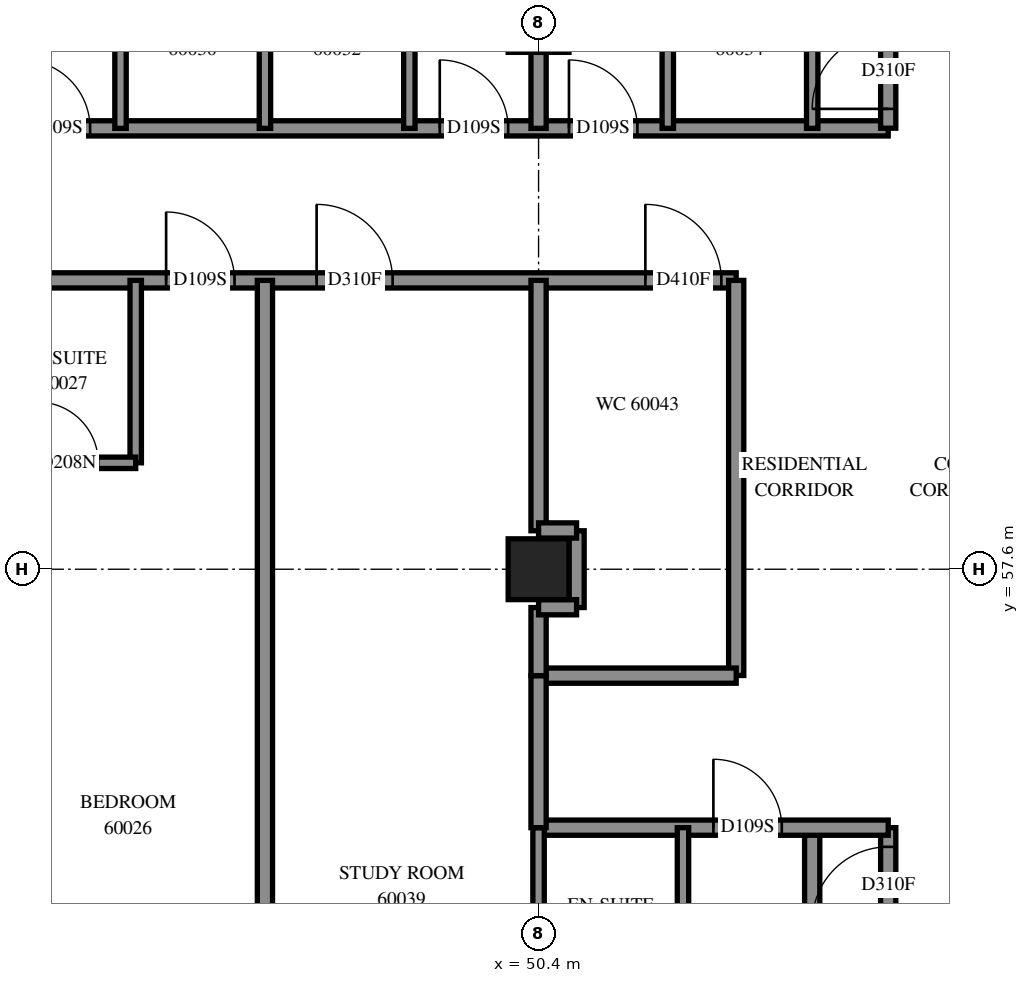
"""IFC4 building model, lengths in metres.
Left out: names, types, materials, properties, quantities, classifications, styles, units other than length and angle.
Written with IfcOpenShell. Run it as: python <this file> out.ifc"""

import sys

from ifc_helpers import new_model, si_unit, direction, frame, frame_2d, origin, origin_2d, place, context, subcontext, project, spatial, rectangle, extrude, element, fill, save


model = new_model("IFC4")
c1 = context("Model", 3, precision=1e-05, world=origin(), true_north=direction((0.0, 1.0)))
c2 = subcontext(c1, "Body", "Model", "MODEL_VIEW")
j1 = project(units=[si_unit("LENGTHUNIT", "METRE"), si_unit("PLANEANGLEUNIT", "RADIAN")], contexts=[c1])
p1 = place(None, origin())
s1 = spatial("IfcSite", under=j1, at=p1, CompositionType="ELEMENT")
p2 = place(p1, origin())
s2 = spatial("IfcBuilding", under=s1, at=p2, CompositionType="ELEMENT")
p3 = place(p2, frame((0.0, 0.0, 220.2)))
s3 = spatial("IfcBuildingStorey", under=s2, at=p3, CompositionType="ELEMENT", Elevation=220.2)
for number, where, z_axis, x_axis in (
    (1, (50.4, 57.6, 0.0), (0.0, 0.0, 1.0), (1.0, 0.0, 0.0)),
    (2, (50.4, 64.8, 0.0), (0.0, 0.0, 1.0), (1.0, 0.0, 0.0)),
):
    element("IfcColumn", number, at=place(p3, frame(where, z_axis=z_axis, x_axis=x_axis)), inside=s3, PredefinedType="COLUMN", context=c2, shape_type="SweptSolid", body=[
        extrude(rectangle(XDim=0.8, YDim=0.8, at=origin_2d()), origin(), (0.0, 0.0, 1.0), 3.1),
    ])
p4 = place(p3, frame((36.0, 61.4, 0.0), z_axis=(0.0, 0.0, 1.0), x_axis=(1.0, 0.0, 0.0)))
e3 = element("IfcWall", 3, at=p4, inside=s3, PredefinedType="PARTITIONING", context=c2, shape_type="SweptSolid", body=[
    extrude(rectangle(XDim=17.0, YDim=0.2, at=frame_2d((8.5, 0.0))), origin(), (0.0, 0.0, 1.0), 3.1),
])
p5 = place(p4, frame((2.3, 0.0, 0.0)))
e4 = element("IfcOpeningElement", 4, at=p5, cuts=e3, PredefinedType="OPENING", context=c2, shape_type="SweptSolid", body=[
    extrude(rectangle(XDim=0.9, YDim=2.1, at=frame_2d((0.45, 1.05))), frame((0.0, 0.11, 0.0), z_axis=(0.0, -1.0, 0.0), x_axis=(1.0, 0.0, 0.0)), (0.0, 0.0, 1.0), 0.22),
])
p6 = place(p4, frame((4.125, 0.0, 0.0)))
e5 = element("IfcOpeningElement", 5, at=p6, cuts=e3, PredefinedType="OPENING", context=c2, shape_type="SweptSolid", body=[
    extrude(rectangle(XDim=1.0, YDim=2.1, at=frame_2d((0.5, 1.05))), frame((0.0, 0.11, 0.0), z_axis=(0.0, -1.0, 0.0), x_axis=(1.0, 0.0, 0.0)), (0.0, 0.0, 1.0), 0.22),
])
p7 = place(p4, frame((9.5, 0.0, 0.0)))
e6 = element("IfcOpeningElement", 6, at=p7, cuts=e3, PredefinedType="OPENING", context=c2, shape_type="SweptSolid", body=[
    extrude(rectangle(XDim=0.9, YDim=2.1, at=frame_2d((0.45, 1.05))), frame((0.0, 0.11, 0.0), z_axis=(0.0, -1.0, 0.0), x_axis=(1.0, 0.0, 0.0)), (0.0, 0.0, 1.0), 0.22),
])
p8 = place(p4, frame((11.48, 0.0, 0.0)))
e7 = element("IfcOpeningElement", 7, at=p8, cuts=e3, PredefinedType="OPENING", context=c2, shape_type="SweptSolid", body=[
    extrude(rectangle(XDim=1.0, YDim=2.1, at=frame_2d((0.5, 1.05))), frame((0.0, 0.11, 0.0), z_axis=(0.0, -1.0, 0.0), x_axis=(1.0, 0.0, 0.0)), (0.0, 0.0, 1.0), 0.22),
])
p9 = place(p4, frame((15.805, 0.0, 0.0)))
e8 = element("IfcOpeningElement", 8, at=p9, cuts=e3, PredefinedType="OPENING", context=c2, shape_type="SweptSolid", body=[
    extrude(rectangle(XDim=1.0, YDim=2.1, at=frame_2d((0.5, 1.05))), frame((0.0, 0.11, 0.0), z_axis=(0.0, -1.0, 0.0), x_axis=(1.0, 0.0, 0.0)), (0.0, 0.0, 1.0), 0.22),
])
p10 = place(p3, frame((40.602, 63.4, 0.0), z_axis=(0.0, 0.0, 1.0), x_axis=(1.0, 0.0, 0.0)))
e9 = element("IfcWall", 9, at=p10, inside=s3, PredefinedType="PARTITIONING", context=c2, shape_type="SweptSolid", body=[
    extrude(rectangle(XDim=14.398, YDim=0.2, at=frame_2d((7.199, 0.0))), origin(), (0.0, 0.0, 1.0), 3.1),
])
p11 = place(p10, frame((2.998, 0.0, 0.0)))
e10 = element("IfcOpeningElement", 10, at=p11, cuts=e9, PredefinedType="OPENING", context=c2, shape_type="SweptSolid", body=[
    extrude(rectangle(XDim=0.9, YDim=2.1, at=frame_2d((0.45, 1.05))), frame((0.0, 0.11, 0.0), z_axis=(0.0, -1.0, 0.0), x_axis=(1.0, 0.0, 0.0)), (0.0, 0.0, 1.0), 0.22),
])
p12 = place(p10, frame((8.498, 0.0, 0.0)))
e11 = element("IfcOpeningElement", 11, at=p12, cuts=e9, PredefinedType="OPENING", context=c2, shape_type="SweptSolid", body=[
    extrude(rectangle(XDim=0.9, YDim=2.1, at=frame_2d((0.45, 1.05))), frame((0.0, 0.11, 0.0), z_axis=(0.0, -1.0, 0.0), x_axis=(1.0, 0.0, 0.0)), (0.0, 0.0, 1.0), 0.22),
])
p13 = place(p10, frame((10.198, 0.0, 0.0)))
e12 = element("IfcOpeningElement", 12, at=p13, cuts=e9, PredefinedType="OPENING", context=c2, shape_type="SweptSolid", body=[
    extrude(rectangle(XDim=0.9, YDim=2.1, at=frame_2d((0.45, 1.05))), frame((0.0, 0.11, 0.0), z_axis=(0.0, -1.0, 0.0), x_axis=(1.0, 0.0, 0.0)), (0.0, 0.0, 1.0), 0.22),
])
p14 = place(p3, frame((54.0, 42.319, 0.0), z_axis=(0.0, 0.0, 1.0), x_axis=(0.0, 1.0, 0.0)))
e13 = element("IfcWall", 13, at=p14, inside=s3, PredefinedType="PARTITIONING", context=c2, shape_type="SweptSolid", body=[
    extrude(rectangle(XDim=11.881, YDim=0.2, at=frame_2d((5.941, 0.0))), origin(), (0.0, 0.0, 1.0), 3.1),
])
p15 = place(p3, frame((46.8, 49.7, 0.0), z_axis=(0.0, 0.0, 1.0), x_axis=(0.0, 1.0, 0.0)))
e14 = element("IfcWall", 14, at=p15, inside=s3, PredefinedType="PARTITIONING", context=c2, shape_type="SweptSolid", body=[
    extrude(rectangle(XDim=11.7, YDim=0.2, at=frame_2d((5.85, 0.0))), origin(), (0.0, 0.0, 1.0), 3.1),
])
p16 = place(p3, frame((55.0, 47.8, 0.0), z_axis=(0.0, 0.0, 1.0), x_axis=(0.0, 1.0, 0.0)))
e15 = element("IfcWall", 15, at=p16, inside=s3, PredefinedType="PARTITIONING", context=c2, shape_type="SweptSolid", body=[
    extrude(rectangle(XDim=6.4, YDim=0.2, at=frame_2d((3.2, 0.0))), origin(), (0.0, 0.0, 1.0), 3.1),
])
p17 = place(p16, frame((5.147, 0.0, 0.0)))
e16 = element("IfcOpeningElement", 16, at=p17, cuts=e15, PredefinedType="OPENING", context=c2, shape_type="SweptSolid", body=[
    extrude(rectangle(XDim=1.0, YDim=2.1, at=frame_2d((0.5, 1.05))), frame((0.0, 0.11, 0.0), z_axis=(0.0, -1.0, 0.0), x_axis=(1.0, 0.0, 0.0)), (0.0, 0.0, 1.0), 0.22),
])
p18 = place(p3, frame((53.0, 56.202, 0.0), z_axis=(0.0, 0.0, 1.0), x_axis=(0.0, 1.0, 0.0)))
e17 = element("IfcWall", 17, at=p18, inside=s3, PredefinedType="PARTITIONING", context=c2, shape_type="SweptSolid", body=[
    extrude(rectangle(XDim=5.198, YDim=0.2, at=frame_2d((2.599, 0.0))), origin(), (0.0, 0.0, 1.0), 3.1),
])
p19 = place(p3, frame((50.4, 54.2, 0.0), z_axis=(0.0, 0.0, 1.0), x_axis=(1.0, 0.0, 0.0)))
e18 = element("IfcWall", 18, at=p19, inside=s3, PredefinedType="PARTITIONING", context=c2, shape_type="SweptSolid", body=[
    extrude(rectangle(XDim=4.6, YDim=0.2, at=frame_2d((2.3, 0.0))), origin(), (0.0, 0.0, 1.0), 3.1),
])
p20 = place(p19, frame((2.3, 0.0, 0.0)))
e19 = element("IfcOpeningElement", 19, at=p20, cuts=e18, PredefinedType="OPENING", context=c2, shape_type="SweptSolid", body=[
    extrude(rectangle(XDim=0.9, YDim=2.1, at=frame_2d((0.45, 1.05))), frame((0.0, 0.11, 0.0), z_axis=(0.0, -1.0, 0.0), x_axis=(1.0, 0.0, 0.0)), (0.0, 0.0, 1.0), 0.22),
])
p21 = place(p3, frame((55.0, 63.402, 0.0), z_axis=(0.0, 0.0, 1.0), x_axis=(0.0, 1.0, 0.0)))
e20 = element("IfcWall", 20, at=p21, inside=s3, PredefinedType="PARTITIONING", context=c2, shape_type="SweptSolid", body=[
    extrude(rectangle(XDim=3.998, YDim=0.2, at=frame_2d((1.999, 0.0))), origin(), (0.0, 0.0, 1.0), 3.1),
])
p22 = place(p21, frame((0.255, 0.0, 0.0)))
e21 = element("IfcOpeningElement", 21, at=p22, cuts=e20, PredefinedType="OPENING", context=c2, shape_type="SweptSolid", body=[
    extrude(rectangle(XDim=1.0, YDim=2.1, at=frame_2d((0.5, 1.05))), frame((0.0, 0.11, 0.0), z_axis=(0.0, -1.0, 0.0), x_axis=(1.0, 0.0, 0.0)), (0.0, 0.0, 1.0), 0.22),
])
p23 = place(p3, frame((50.4, 58.106, 0.0), z_axis=(0.0, 0.0, 1.0), x_axis=(0.0, 1.0, 0.0)))
e22 = element("IfcWall", 22, at=p23, inside=s3, PredefinedType="PARTITIONING", context=c2, shape_type="SweptSolid", body=[
    extrude(rectangle(XDim=3.294, YDim=0.2, at=frame_2d((1.647, 0.0))), origin(), (0.0, 0.0, 1.0), 3.1),
])
p24 = place(p3, frame((50.4, 56.2, 0.0), z_axis=(0.0, 0.0, 1.0), x_axis=(1.0, 0.0, 0.0)))
e23 = element("IfcWall", 23, at=p24, inside=s3, PredefinedType="PARTITIONING", context=c2, shape_type="SweptSolid", body=[
    extrude(rectangle(XDim=2.6, YDim=0.2, at=frame_2d((1.3, 0.0))), origin(), (0.0, 0.0, 1.0), 3.1),
])
for number, where, z_axis, x_axis in (
    (24, (52.3, 51.8, 0.0), (0.0, 0.0, 1.0), (0.0, 1.0, 0.0)),
    (25, (50.4, 51.8, 0.0), (0.0, 0.0, 1.0), (0.0, 1.0, 0.0)),
    (26, (45.1, 59.0, 0.0), (0.0, 0.0, 1.0), (0.0, 1.0, 0.0)),
    (27, (44.9, 63.4, 0.0), (0.0, 0.0, 1.0), (0.0, 1.0, 0.0)),
    (28, (46.8, 63.4, 0.0), (0.0, 0.0, 1.0), (0.0, 1.0, 0.0)),
    (29, (48.7, 63.4, 0.0), (0.0, 0.0, 1.0), (0.0, 1.0, 0.0)),
    (30, (52.1, 63.4, 0.0), (0.0, 0.0, 1.0), (0.0, 1.0, 0.0)),
    (31, (54.0, 63.4, 0.0), (0.0, 0.0, 1.0), (0.0, 1.0, 0.0)),
):
    element("IfcWall", number, at=place(p3, frame(where, z_axis=z_axis, x_axis=x_axis)), inside=s3, PredefinedType="PARTITIONING", context=c2, shape_type="SweptSolid", body=[
        extrude(rectangle(XDim=2.4, YDim=0.15, at=frame_2d((1.2, 0.0))), origin(), (0.0, 0.0, 1.0), 3.1),
    ])
p25 = place(p3, frame((50.4, 54.2, 0.0), z_axis=(0.0, 0.0, 1.0), x_axis=(0.0, 1.0, 0.0)))
e32 = element("IfcWall", 32, at=p25, inside=s3, PredefinedType="PARTITIONING", context=c2, shape_type="SweptSolid", body=[
    extrude(rectangle(XDim=2.0, YDim=0.2, at=frame_2d((1.0, 0.0))), origin(), (0.0, 0.0, 1.0), 3.1),
])
p26 = place(p3, frame((43.2, 59.0, 0.0), z_axis=(0.0, 0.0, 1.0), x_axis=(1.0, 0.0, 0.0)))
e33 = element("IfcWall", 33, at=p26, inside=s3, PredefinedType="PARTITIONING", context=c2, shape_type="SweptSolid", body=[
    extrude(rectangle(XDim=1.9, YDim=0.15, at=frame_2d((0.95, 0.0))), origin(), (0.0, 0.0, 1.0), 3.1),
])
p27 = place(p26, frame((0.607, 0.0, 0.0)))
e34 = element("IfcOpeningElement", 34, at=p27, cuts=e33, PredefinedType="OPENING", context=c2, shape_type="SweptSolid", body=[
    extrude(rectangle(XDim=0.8, YDim=2.1, at=frame_2d((0.4, 1.05))), frame((0.0, 0.085, 0.0), z_axis=(0.0, -1.0, 0.0), x_axis=(1.0, 0.0, 0.0)), (0.0, 0.0, 1.0), 0.17),
])
p28 = place(p3, frame((50.9, 57.096, 0.0), z_axis=(0.0, 0.0, 1.0), x_axis=(0.0, 1.0, 0.0)))
e35 = element("IfcWall", 35, at=p28, inside=s3, PredefinedType="PARTITIONING", context=c2, shape_type="SweptSolid", body=[
    extrude(rectangle(XDim=1.01, YDim=0.2, at=frame_2d((0.505, 0.0))), origin(), (0.0, 0.0, 1.0), 3.1),
])
p29 = place(p3, frame((50.4, 63.4, 0.0), z_axis=(0.0, 0.0, 1.0), x_axis=(0.0, 1.0, 0.0)))
e36 = element("IfcWall", 36, at=p29, inside=s3, PredefinedType="PARTITIONING", context=c2, shape_type="SweptSolid", body=[
    extrude(rectangle(XDim=1.0, YDim=0.2, at=frame_2d((0.5, 0.0))), origin(), (0.0, 0.0, 1.0), 3.1),
])
p30 = place(p3, frame((50.4, 56.2, 0.0), z_axis=(0.0, 0.0, 1.0), x_axis=(0.0, 1.0, 0.0)))
e37 = element("IfcWall", 37, at=p30, inside=s3, PredefinedType="PARTITIONING", context=c2, shape_type="SweptSolid", body=[
    extrude(rectangle(XDim=0.896, YDim=0.2, at=frame_2d((0.448, 0.0))), origin(), (0.0, 0.0, 1.0), 3.1),
])
for number, where, z_axis, x_axis in (
    (38, (50.4, 58.11, 0.0), (0.0, 0.0, 1.0), (1.0, 0.0, 0.0)),
    (39, (50.4, 57.1, 0.0), (0.0, 0.0, 1.0), (1.0, 0.0, 0.0)),
):
    element("IfcWall", number, at=place(p3, frame(where, z_axis=z_axis, x_axis=x_axis)), inside=s3, PredefinedType="PARTITIONING", context=c2, shape_type="SweptSolid", body=[
        extrude(rectangle(XDim=0.5, YDim=0.2, at=frame_2d((0.25, 0.0))), origin(), (0.0, 0.0, 1.0), 3.1),
    ])
p31 = place(p7, origin())
e40 = element("IfcDoor", 40, at=p31, inside=s3, OperationType="SINGLE_SWING_LEFT", PredefinedType="DOOR", context=c2, shape_type="SweptSolid", body=[
    extrude(rectangle(XDim=0.9, YDim=2.1, at=frame_2d((0.45, 1.05))), frame((0.0, 0.025, 0.0), z_axis=(0.0, -1.0, 0.0), x_axis=(1.0, 0.0, 0.0)), (0.0, 0.0, 1.0), 0.05),
])
fill(e6, e40)
p32 = place(p27, origin())
e41 = element("IfcDoor", 41, at=p32, inside=s3, OperationType="SINGLE_SWING_RIGHT", PredefinedType="DOOR", context=c2, shape_type="SweptSolid", body=[
    extrude(rectangle(XDim=0.8, YDim=2.1, at=frame_2d((0.4, 1.05))), frame((0.0, 0.025, 0.0), z_axis=(0.0, -1.0, 0.0), x_axis=(1.0, 0.0, 0.0)), (0.0, 0.0, 1.0), 0.05),
])
fill(e34, e41)
p33 = place(p11, origin())
e42 = element("IfcDoor", 42, at=p33, inside=s3, OperationType="SINGLE_SWING_RIGHT", PredefinedType="DOOR", context=c2, shape_type="SweptSolid", body=[
    extrude(rectangle(XDim=0.9, YDim=2.1, at=frame_2d((0.45, 1.05))), frame((0.0, 0.025, 0.0), z_axis=(0.0, -1.0, 0.0), x_axis=(1.0, 0.0, 0.0)), (0.0, 0.0, 1.0), 0.05),
])
fill(e10, e42)
p34 = place(p12, origin())
e43 = element("IfcDoor", 43, at=p34, inside=s3, OperationType="SINGLE_SWING_LEFT", PredefinedType="DOOR", context=c2, shape_type="SweptSolid", body=[
    extrude(rectangle(XDim=0.9, YDim=2.1, at=frame_2d((0.45, 1.05))), frame((0.0, 0.025, 0.0), z_axis=(0.0, -1.0, 0.0), x_axis=(1.0, 0.0, 0.0)), (0.0, 0.0, 1.0), 0.05),
])
fill(e11, e43)
p35 = place(p13, origin())
e44 = element("IfcDoor", 44, at=p35, inside=s3, OperationType="SINGLE_SWING_RIGHT", PredefinedType="DOOR", context=c2, shape_type="SweptSolid", body=[
    extrude(rectangle(XDim=0.9, YDim=2.1, at=frame_2d((0.45, 1.05))), frame((0.0, 0.025, 0.0), z_axis=(0.0, -1.0, 0.0), x_axis=(1.0, 0.0, 0.0)), (0.0, 0.0, 1.0), 0.05),
])
fill(e12, e44)
p36 = place(p22, origin())
e45 = element("IfcDoor", 45, at=p36, inside=s3, OperationType="SINGLE_SWING_LEFT", PredefinedType="DOOR", context=c2, shape_type="SweptSolid", body=[
    extrude(rectangle(XDim=1.0, YDim=2.1, at=frame_2d((0.5, 1.05))), frame((0.0, 0.025, 0.0), z_axis=(0.0, -1.0, 0.0), x_axis=(1.0, 0.0, 0.0)), (0.0, 0.0, 1.0), 0.05),
])
fill(e21, e45)
p37 = place(p8, origin())
e46 = element("IfcDoor", 46, at=p37, inside=s3, OperationType="SINGLE_SWING_RIGHT", PredefinedType="DOOR", context=c2, shape_type="SweptSolid", body=[
    extrude(rectangle(XDim=1.0, YDim=2.1, at=frame_2d((0.5, 1.05))), frame((0.0, 0.025, 0.0), z_axis=(0.0, -1.0, 0.0), x_axis=(1.0, 0.0, 0.0)), (0.0, 0.0, 1.0), 0.05),
])
fill(e7, e46)
p38 = place(p20, origin())
e47 = element("IfcDoor", 47, at=p38, inside=s3, OperationType="SINGLE_SWING_LEFT", PredefinedType="DOOR", context=c2, shape_type="SweptSolid", body=[
    extrude(rectangle(XDim=0.9, YDim=2.1, at=frame_2d((0.45, 1.05))), frame((0.0, 0.025, 0.0), z_axis=(0.0, -1.0, 0.0), x_axis=(1.0, 0.0, 0.0)), (0.0, 0.0, 1.0), 0.05),
])
fill(e19, e47)
p39 = place(p17, origin())
e48 = element("IfcDoor", 48, at=p39, inside=s3, OperationType="SINGLE_SWING_RIGHT", PredefinedType="DOOR", context=c2, shape_type="SweptSolid", body=[
    extrude(rectangle(XDim=1.0, YDim=2.1, at=frame_2d((0.5, 1.05))), frame((0.0, 0.025, 0.0), z_axis=(0.0, -1.0, 0.0), x_axis=(1.0, 0.0, 0.0)), (0.0, 0.0, 1.0), 0.05),
])
fill(e16, e48)
p40 = place(p9, origin())
e49 = element("IfcDoor", 49, at=p40, inside=s3, OperationType="SINGLE_SWING_LEFT", PredefinedType="DOOR", context=c2, shape_type="SweptSolid", body=[
    extrude(rectangle(XDim=1.0, YDim=2.1, at=frame_2d((0.5, 1.05))), frame((0.0, 0.025, 0.0), z_axis=(0.0, -1.0, 0.0), x_axis=(1.0, 0.0, 0.0)), (0.0, 0.0, 1.0), 0.05),
])
fill(e8, e49)
save(model, sys.argv[1])
